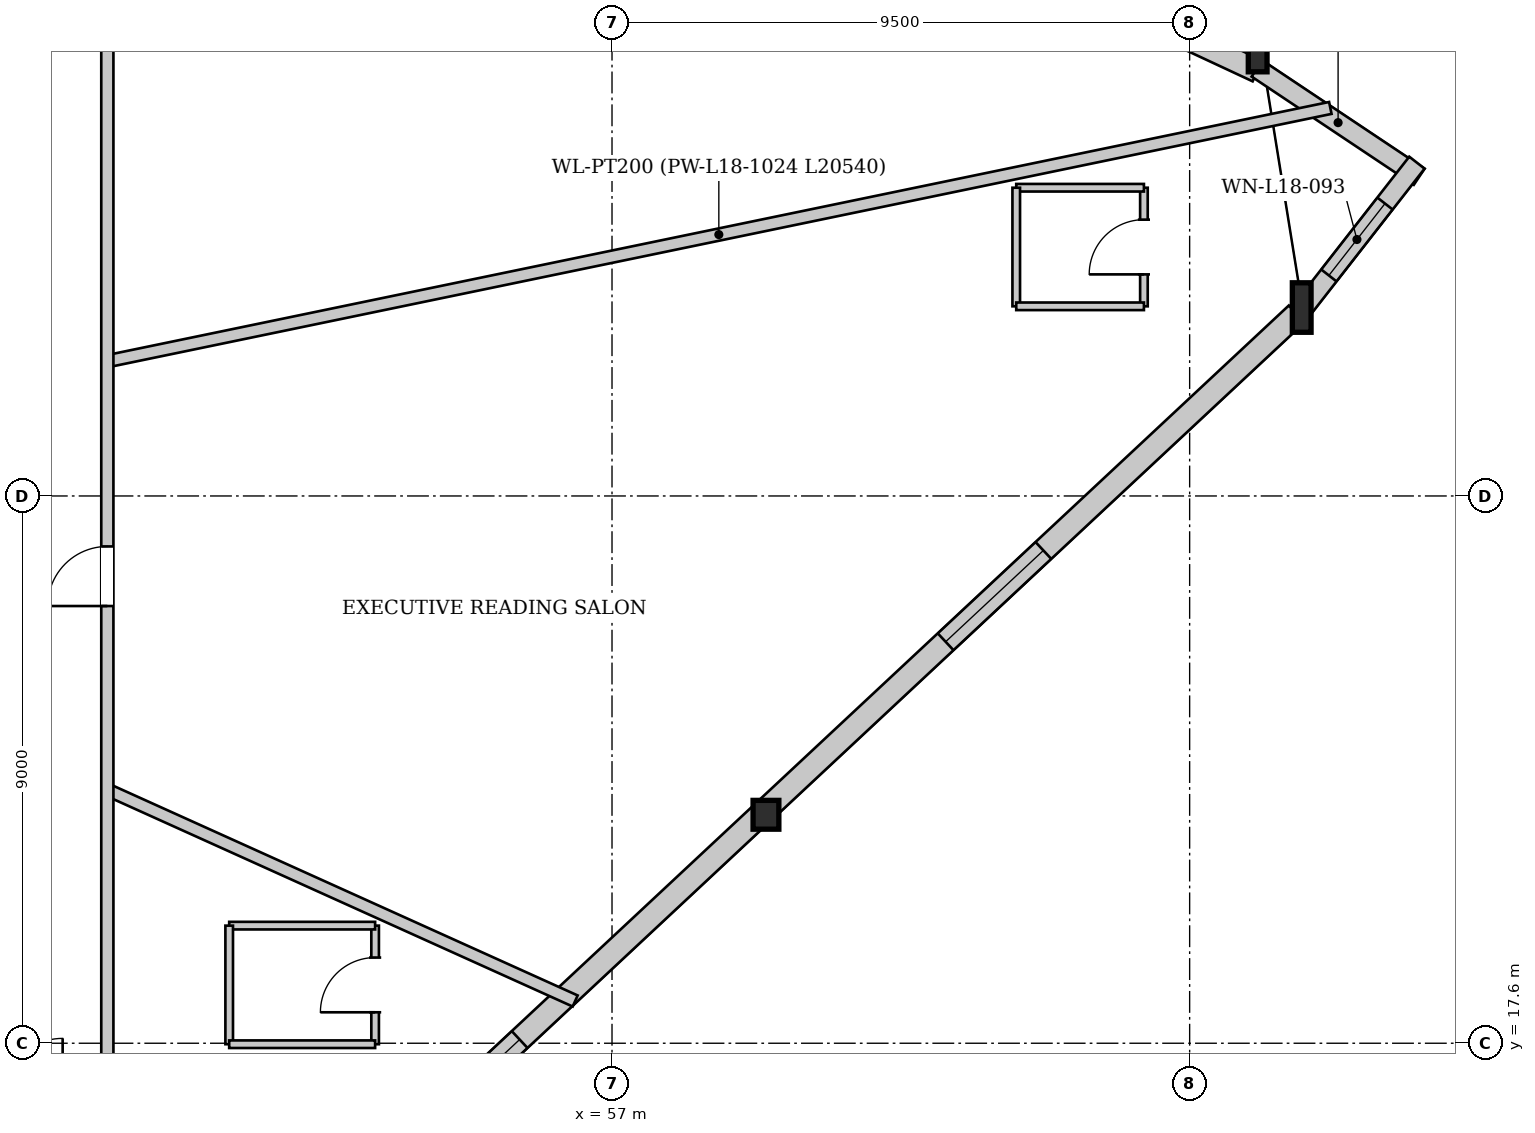
"""IFC4 building model, lengths in metres.
Left out: names, types, materials, properties, quantities, classifications, styles, units other than length and angle.
Written with IfcOpenShell. Run it as: python <this file> out.ifc"""

import sys

from ifc_helpers import new_model, si_unit, direction, frame, frame_2d, origin, origin_2d, place, context, subcontext, project, spatial, rectangle, i_section, extrude, source, transform, mapped, element, fill, save


model = new_model("IFC4")
c1 = context("Model", 3, precision=1e-05, world=origin(), true_north=direction((0.0, 1.0)))
c2 = subcontext(c1, "Body", "Model", "MODEL_VIEW")
j1 = project(units=[si_unit("LENGTHUNIT", "METRE"), si_unit("PLANEANGLEUNIT", "RADIAN")], contexts=[c1])
p1 = place(None, origin())
s1 = spatial("IfcSite", under=j1, at=p1, CompositionType="ELEMENT")
p2 = place(p1, origin())
s2 = spatial("IfcBuilding", under=s1, at=p2, CompositionType="ELEMENT")
p3 = place(p2, frame((0.0, 0.0, 71.9)))
s3 = spatial("IfcBuildingStorey", under=s2, at=p3, CompositionType="ELEMENT", Elevation=71.9)
m1 = source(origin(), c2, "Body", "SweptSolid", [
    extrude(i_section(OverallWidth=0.308, OverallDepth=0.814, WebThickness=0.021, FlangeThickness=0.04, at=origin_2d()), origin(), (0.0, 0.0, 1.0), 3.867),
])
p4 = place(p3, frame((68.391, 29.455, 0.0), z_axis=(-0.024620663351, 0.126133552244, 0.991707693796), x_axis=(-0.981477077245, -0.191579609672, 0.0)))
e1 = element("IfcColumn", 1, at=p4, inside=s3, PredefinedType="COLUMN", context=c2, shape_type="MappedRepresentation", body=[
    mapped(m1, transform((0.0, 0.0, 0.0), x_axis=(1.0, 0.0, 0.0), y_axis=(0.0, 1.0, 0.0), z_axis=(0.0, 0.0, 1.0), scale=1.0)),
])
m2 = source(origin(), c2, "Body", "SweptSolid", [
    extrude(i_section(OverallWidth=0.308, OverallDepth=0.814, WebThickness=0.021, FlangeThickness=0.04, at=origin_2d()), origin(), (0.0, 0.0, 1.0), 3.863),
])
p5 = place(p3, frame((67.697, 33.763, 0.0), z_axis=(-0.040443883228, 0.113558840876, 0.992707752548), x_axis=(-0.942038054794, -0.335506040661, 0.0)))
e2 = element("IfcColumn", 2, at=p5, inside=s3, PredefinedType="COLUMN", context=c2, shape_type="MappedRepresentation", body=[
    mapped(m2, transform((0.0, 0.0, 0.0), x_axis=(1.0, 0.0, 0.0), y_axis=(0.0, 1.0, 0.0), z_axis=(0.0, 0.0, 1.0), scale=1.0)),
])
m3 = source(origin(), c2, "Body", "SweptSolid", [
    extrude(i_section(OverallWidth=0.424, OverallDepth=0.474, WebThickness=0.043, FlangeThickness=0.068, at=origin_2d()), origin(), (0.0, 0.0, 1.0), 3.854),
])
p6 = place(p3, frame((59.516, 21.168, 0.0), z_axis=(0.00836218635, 0.097875590238, 0.995163525595), x_axis=(-0.996370128679, 0.085126768275, 0.0)))
e3 = element("IfcColumn", 3, at=p6, inside=s3, PredefinedType="COLUMN", context=c2, shape_type="MappedRepresentation", body=[
    mapped(m3, transform((0.0, 0.0, 0.0), x_axis=(1.0, 0.0, 0.0), y_axis=(0.0, 1.0, 0.0), z_axis=(0.0, 0.0, 1.0), scale=1.0)),
])
p7 = place(p3, frame((46.163, 43.595, 0.0), z_axis=(0.0, 0.0, 1.0), x_axis=(0.906302989161, -0.422628550667, 0.0)))
e4 = element("IfcWall", 4, at=p7, inside=s3, PredefinedType="SOLIDWALL", context=c2, shape_type="SweptSolid", body=[
    extrude(rectangle(XDim=23.672, YDim=0.38, at=frame_2d((11.836, 0.0))), origin(), (0.0, 0.0, 1.0), 3.042),
])
p8 = place(p7, frame((5.528, 0.0, 0.65)))
e5 = element("IfcOpeningElement", 5, at=p8, cuts=e4, PredefinedType="OPENING", context=c2, shape_type="SweptSolid", body=[
    extrude(rectangle(XDim=2.2, YDim=2.25, at=frame_2d((1.1, 1.125))), frame((0.0, 0.2, 0.0), z_axis=(0.0, -1.0, 0.0), x_axis=(1.0, 0.0, 0.0)), (0.0, 0.0, 1.0), 0.4),
])
p9 = place(p7, frame((15.944, 0.0, 0.65)))
e6 = element("IfcOpeningElement", 6, at=p9, cuts=e4, PredefinedType="OPENING", context=c2, shape_type="SweptSolid", body=[
    extrude(rectangle(XDim=2.2, YDim=2.25, at=frame_2d((1.1, 1.125))), frame((0.0, 0.2, 0.0), z_axis=(0.0, -1.0, 0.0), x_axis=(1.0, 0.0, 0.0)), (0.0, 0.0, 1.0), 0.4),
])
p10 = place(p3, frame((67.608, 33.63, 0.0), z_axis=(0.0, 0.0, 1.0), x_axis=(0.831757330832, -0.55513939025, 0.0)))
e7 = element("IfcWall", 7, at=p10, inside=s3, PredefinedType="SOLIDWALL", context=c2, shape_type="SweptSolid", body=[
    extrude(rectangle(XDim=3.207, YDim=0.32, at=frame_2d((1.603, 0.0))), origin(), (0.0, 0.0, 1.0), 3.042),
])
p11 = place(p3, frame((70.238, 32.081, 0.0), z_axis=(0.0, 0.0, 1.0), x_axis=(-0.615310089373, -0.788285160279, 0.0)))
e8 = element("IfcWall", 8, at=p11, inside=s3, PredefinedType="SOLIDWALL", context=c2, shape_type="SweptSolid", body=[
    extrude(rectangle(XDim=3.207, YDim=0.32, at=frame_2d((1.604, 0.0))), origin(), (0.0, 0.0, 1.0), 3.042),
])
p12 = place(p11, frame((0.853, 0.0, 0.622)))
e9 = element("IfcOpeningElement", 9, at=p12, cuts=e8, PredefinedType="OPENING", context=c2, shape_type="SweptSolid", body=[
    extrude(rectangle(XDim=1.5, YDim=2.3, at=frame_2d((0.75, 1.15))), frame((0.0, 0.17, 0.0), z_axis=(0.0, -1.0, 0.0), x_axis=(1.0, 0.0, 0.0)), (0.0, 0.0, 1.0), 0.34),
])
p13 = place(p3, frame((68.261, 29.594, 0.0), z_axis=(0.0, 0.0, 1.0), x_axis=(-0.730910825088, -0.682472978051, 0.0)))
e10 = element("IfcWall", 10, at=p13, inside=s3, PredefinedType="SOLIDWALL", context=c2, shape_type="SweptSolid", body=[
    extrude(rectangle(XDim=24.284, YDim=0.38, at=frame_2d((12.142, 0.0))), origin(), (0.0, 0.0, 1.0), 3.042),
])
p14 = place(p13, frame((5.7, 0.0, 0.65)))
e11 = element("IfcOpeningElement", 11, at=p14, cuts=e10, PredefinedType="OPENING", context=c2, shape_type="SweptSolid", body=[
    extrude(rectangle(XDim=2.2, YDim=2.25, at=frame_2d((1.1, 1.125))), frame((0.0, 0.2, 0.0), z_axis=(0.0, -1.0, 0.0), x_axis=(1.0, 0.0, 0.0)), (0.0, 0.0, 1.0), 0.4),
])
p15 = place(p13, frame((17.485, 0.0, 0.65)))
e12 = element("IfcOpeningElement", 12, at=p15, cuts=e10, PredefinedType="OPENING", context=c2, shape_type="SweptSolid", body=[
    extrude(rectangle(XDim=2.2, YDim=2.25, at=frame_2d((1.1, 1.125))), frame((0.0, 0.2, 0.0), z_axis=(0.0, -1.0, 0.0), x_axis=(1.0, 0.0, 0.0)), (0.0, 0.0, 1.0), 0.4),
])
p16 = place(p3, frame((48.7, 28.816, 0.0), z_axis=(0.0, 0.0, 1.0), x_axis=(0.979223566827, 0.202783643746, 0.0)))
e13 = element("IfcWall", 13, at=p16, inside=s3, PredefinedType="PARTITIONING", context=c2, shape_type="SweptSolid", body=[
    extrude(rectangle(XDim=20.541, YDim=0.2, at=frame_2d((10.27, 0.0))), origin(), (0.0, 0.0, 1.0), 3.245),
])
p17 = place(p3, frame((48.7, 21.769, 0.0), z_axis=(0.0, 0.0, 1.0), x_axis=(0.911403489645, -0.41151388684, 0.0)))
e14 = element("IfcWall", 14, at=p17, inside=s3, PredefinedType="PARTITIONING", context=c2, shape_type="SweptSolid", body=[
    extrude(rectangle(XDim=8.442, YDim=0.2, at=frame_2d((4.221, 0.0))), origin(), (0.0, 0.0, 1.0), 3.75),
])
p18 = place(p3, frame((53.104, 17.584, 0.0), z_axis=(0.0, 0.0, 1.0), x_axis=(0.0, 1.0, 0.0)))
e15 = element("IfcWall", 15, at=p18, inside=s3, PredefinedType="PARTITIONING", context=c2, shape_type="SweptSolid", body=[
    extrude(rectangle(XDim=1.95, YDim=0.125, at=frame_2d((0.975, 0.0))), origin(), (0.0, 0.0, 1.0), 3.75),
])
p19 = place(p18, frame((0.525, 0.0, 0.0)))
e16 = element("IfcOpeningElement", 16, at=p19, cuts=e15, PredefinedType="OPENING", context=c2, shape_type="SweptSolid", body=[
    extrude(rectangle(XDim=0.9, YDim=2.1, at=frame_2d((0.45, 1.05))), frame((0.0, 0.073, 0.0), z_axis=(0.0, -1.0, 0.0), x_axis=(1.0, 0.0, 0.0)), (0.0, 0.0, 1.0), 0.145),
])
p20 = place(p3, frame((53.104, 19.534, 0.0), z_axis=(0.0, 0.0, 1.0), x_axis=(-1.0, 0.0, 0.0)))
e17 = element("IfcWall", 17, at=p20, inside=s3, PredefinedType="PARTITIONING", context=c2, shape_type="SweptSolid", body=[
    extrude(rectangle(XDim=2.4, YDim=0.125, at=frame_2d((1.2, 0.0))), origin(), (0.0, 0.0, 1.0), 3.75),
])
p21 = place(p3, frame((50.704, 19.534, 0.0), z_axis=(0.0, 0.0, 1.0), x_axis=(0.0, -1.0, 0.0)))
e18 = element("IfcWall", 18, at=p21, inside=s3, PredefinedType="PARTITIONING", context=c2, shape_type="SweptSolid", body=[
    extrude(rectangle(XDim=1.95, YDim=0.125, at=frame_2d((0.975, 0.0))), origin(), (0.0, 0.0, 1.0), 3.75),
])
p22 = place(p3, frame((50.704, 17.584, 0.0), z_axis=(0.0, 0.0, 1.0), x_axis=(1.0, 0.0, 0.0)))
e19 = element("IfcWall", 19, at=p22, inside=s3, PredefinedType="PARTITIONING", context=c2, shape_type="SweptSolid", body=[
    extrude(rectangle(XDim=2.4, YDim=0.125, at=frame_2d((1.2, 0.0))), origin(), (0.0, 0.0, 1.0), 3.75),
])
p23 = place(p3, frame((65.748, 29.719, 0.0), z_axis=(0.0, 0.0, 1.0), x_axis=(0.0, 1.0, 0.0)))
e20 = element("IfcWall", 20, at=p23, inside=s3, PredefinedType="PARTITIONING", context=c2, shape_type="SweptSolid", body=[
    extrude(rectangle(XDim=1.95, YDim=0.125, at=frame_2d((0.975, 0.0))), origin(), (0.0, 0.0, 1.0), 3.75),
])
p24 = place(p23, frame((0.525, 0.0, 0.0)))
e21 = element("IfcOpeningElement", 21, at=p24, cuts=e20, PredefinedType="OPENING", context=c2, shape_type="SweptSolid", body=[
    extrude(rectangle(XDim=0.9, YDim=2.1, at=frame_2d((0.45, 1.05))), frame((0.0, 0.073, 0.0), z_axis=(0.0, -1.0, 0.0), x_axis=(1.0, 0.0, 0.0)), (0.0, 0.0, 1.0), 0.145),
])
p25 = place(p3, frame((65.748, 31.669, 0.0), z_axis=(0.0, 0.0, 1.0), x_axis=(-1.0, 0.0, 0.0)))
e22 = element("IfcWall", 22, at=p25, inside=s3, PredefinedType="PARTITIONING", context=c2, shape_type="SweptSolid", body=[
    extrude(rectangle(XDim=2.1, YDim=0.125, at=frame_2d((1.05, 0.0))), origin(), (0.0, 0.0, 1.0), 3.245),
])
p26 = place(p3, frame((63.648, 31.669, 0.0), z_axis=(0.0, 0.0, 1.0), x_axis=(0.0, -1.0, 0.0)))
e23 = element("IfcWall", 23, at=p26, inside=s3, PredefinedType="PARTITIONING", context=c2, shape_type="SweptSolid", body=[
    extrude(rectangle(XDim=1.95, YDim=0.125, at=frame_2d((0.975, 0.0))), origin(), (0.0, 0.0, 1.0), 3.75),
])
p27 = place(p3, frame((63.648, 29.719, 0.0), z_axis=(0.0, 0.0, 1.0), x_axis=(1.0, 0.0, 0.0)))
e24 = element("IfcWall", 24, at=p27, inside=s3, PredefinedType="PARTITIONING", context=c2, shape_type="SweptSolid", body=[
    extrude(rectangle(XDim=2.1, YDim=0.125, at=frame_2d((1.05, 0.0))), origin(), (0.0, 0.0, 1.0), 3.245),
])
p28 = place(p3, frame((48.7, 16.7, 0.0), z_axis=(0.0, 0.0, 1.0), x_axis=(0.0, 1.0, 0.0)))
e25 = element("IfcWall", 25, at=p28, inside=s3, PredefinedType="PARTITIONING", context=c2, shape_type="SweptSolid", body=[
    extrude(rectangle(XDim=19.8, YDim=0.2, at=frame_2d((9.9, 0.0))), origin(), (0.0, 0.0, 1.0), 3.75),
])
p29 = place(p28, frame((8.09, 0.0, 0.0)))
e26 = element("IfcOpeningElement", 26, at=p29, cuts=e25, PredefinedType="OPENING", context=c2, shape_type="SweptSolid", body=[
    extrude(rectangle(XDim=0.98, YDim=2.15, at=frame_2d((0.49, 1.075))), frame((0.0, 0.11, 0.0), z_axis=(0.0, -1.0, 0.0), x_axis=(1.0, 0.0, 0.0)), (0.0, 0.0, 1.0), 0.22),
])
m4 = source(origin(), c2, "Body", "SweptSolid", [
    extrude(rectangle(XDim=1.5, YDim=2.3, at=frame_2d((0.75, 1.15))), frame((0.0, 0.03, 0.0), z_axis=(0.0, -1.0, 0.0), x_axis=(1.0, 0.0, 0.0)), (0.0, 0.0, 1.0), 0.06),
])
p30 = place(p12, origin())
e27 = element("IfcWindow", 27, at=p30, inside=s3, PartitioningType="SINGLE_PANEL", PredefinedType="WINDOW", context=c2, shape_type="MappedRepresentation", body=[
    mapped(m4, transform((0.0, 0.0, 0.0), x_axis=(1.0, 0.0, 0.0), y_axis=(0.0, 1.0, 0.0), z_axis=(0.0, 0.0, 1.0), scale=1.0)),
])
fill(e9, e27)
m5 = source(origin(), c2, "Body", "SweptSolid", [
    extrude(rectangle(XDim=2.2, YDim=2.25, at=frame_2d((1.1, 1.125))), frame((0.0, 0.03, 0.0), z_axis=(0.0, -1.0, 0.0), x_axis=(1.0, 0.0, 0.0)), (0.0, 0.0, 1.0), 0.06),
])
p31 = place(p14, origin())
e28 = element("IfcWindow", 28, at=p31, inside=s3, PartitioningType="SINGLE_PANEL", PredefinedType="WINDOW", context=c2, shape_type="MappedRepresentation", body=[
    mapped(m5, transform((0.0, 0.0, 0.0), x_axis=(1.0, 0.0, 0.0), y_axis=(0.0, 1.0, 0.0), z_axis=(0.0, 0.0, 1.0), scale=1.0)),
])
fill(e11, e28)
p32 = place(p15, origin())
e29 = element("IfcWindow", 29, at=p32, inside=s3, PartitioningType="SINGLE_PANEL", PredefinedType="WINDOW", context=c2, shape_type="MappedRepresentation", body=[
    mapped(m5, transform((0.0, 0.0, 0.0), x_axis=(1.0, 0.0, 0.0), y_axis=(0.0, 1.0, 0.0), z_axis=(0.0, 0.0, 1.0), scale=1.0)),
])
fill(e12, e29)
m6 = source(origin(), c2, "Body", "SweptSolid", [
    extrude(rectangle(XDim=0.9, YDim=2.1, at=frame_2d((0.45, 1.05))), frame((0.0, 0.025, 0.0), z_axis=(0.0, -1.0, 0.0), x_axis=(1.0, 0.0, 0.0)), (0.0, 0.0, 1.0), 0.05),
])
p33 = place(p19, origin())
e30 = element("IfcDoor", 30, at=p33, inside=s3, OperationType="SINGLE_SWING_LEFT", PredefinedType="DOOR", context=c2, shape_type="MappedRepresentation", body=[
    mapped(m6, transform((0.0, 0.0, 0.0), x_axis=(1.0, 0.0, 0.0), y_axis=(0.0, 1.0, 0.0), z_axis=(0.0, 0.0, 1.0), scale=1.0)),
])
fill(e16, e30)
p34 = place(p24, origin())
e31 = element("IfcDoor", 31, at=p34, inside=s3, OperationType="SINGLE_SWING_LEFT", PredefinedType="DOOR", context=c2, shape_type="MappedRepresentation", body=[
    mapped(m6, transform((0.0, 0.0, 0.0), x_axis=(1.0, 0.0, 0.0), y_axis=(0.0, 1.0, 0.0), z_axis=(0.0, 0.0, 1.0), scale=1.0)),
])
fill(e21, e31)
m7 = source(origin(), c2, "Body", "SweptSolid", [
    extrude(rectangle(XDim=0.98, YDim=2.15, at=frame_2d((0.49, 1.075))), frame((0.0, 0.025, 0.0), z_axis=(0.0, -1.0, 0.0), x_axis=(1.0, 0.0, 0.0)), (0.0, 0.0, 1.0), 0.05),
])
p35 = place(p29, origin())
e32 = element("IfcDoor", 32, at=p35, inside=s3, OperationType="SINGLE_SWING_LEFT", PredefinedType="DOOR", context=c2, shape_type="MappedRepresentation", body=[
    mapped(m7, transform((0.0, 0.0, 0.0), x_axis=(1.0, 0.0, 0.0), y_axis=(0.0, 1.0, 0.0), z_axis=(0.0, 0.0, 1.0), scale=1.0)),
])
fill(e26, e32)
save(model, sys.argv[1])
